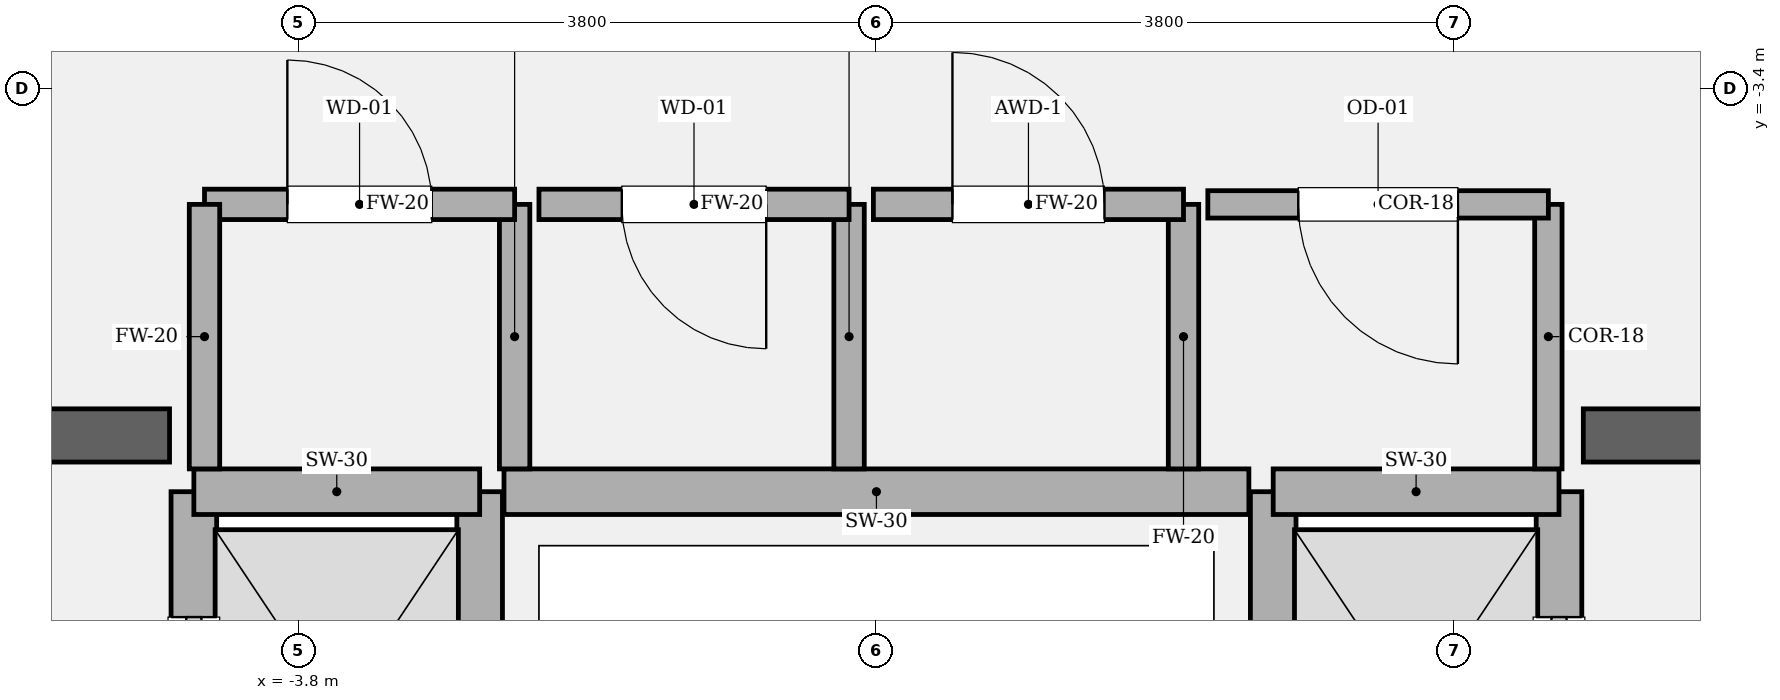
"""IFC4 building model, lengths in metres.
Left out: names, types, materials, properties, quantities, classifications, styles, units other than length and angle.
Written with IfcOpenShell. Run it as: python <this file> out.ifc"""

import sys

from ifc_helpers import new_model, si_unit, direction, frame, frame_2d, origin, place, context, subcontext, project, spatial, rectangle, extrude, element, fill, save


model = new_model("IFC4")
c1 = context("Model", 3, precision=1e-05, world=origin(), true_north=direction((0.0, 1.0)))
c2 = subcontext(c1, "Body", "Model", "MODEL_VIEW")
j1 = project(units=[si_unit("LENGTHUNIT", "METRE"), si_unit("PLANEANGLEUNIT", "RADIAN")], contexts=[c1])
p1 = place(None, origin())
s1 = spatial("IfcSite", under=j1, at=p1, CompositionType="ELEMENT")
p2 = place(p1, origin())
s2 = spatial("IfcBuilding", under=s1, at=p2, CompositionType="ELEMENT")
p3 = place(p2, frame((0.0, 0.0, 117.3)))
s3 = spatial("IfcBuildingStorey", under=s2, at=p3, CompositionType="ELEMENT", Elevation=117.3)
p4 = place(p3, frame((-9.825, -5.68, 0.0), z_axis=(0.0, 0.0, 1.0), x_axis=(1.0, 0.0, 0.0)))
e1 = element("IfcWall", 1, at=p4, inside=s3, PredefinedType="SOLIDWALL", context=c2, shape_type="SweptSolid", body=[
    extrude(rectangle(XDim=5.175, YDim=0.35, at=frame_2d((2.587, 0.0))), origin(), (0.0, 0.0, 1.0), 4.05),
])
p5 = place(p4, frame((1.285, 0.0, 0.0)))
e2 = element("IfcOpeningElement", 2, at=p5, cuts=e1, PredefinedType="OPENING", context=c2, shape_type="SweptSolid", body=[
    extrude(rectangle(XDim=1.18, YDim=2.2, at=frame_2d((0.59, 1.1))), frame((0.0, 0.185, 0.0), z_axis=(0.0, -1.0, 0.0), x_axis=(1.0, 0.0, 0.0)), (0.0, 0.0, 1.0), 0.37),
])
p6 = place(p3, frame((4.65, -5.68, 0.0), z_axis=(0.0, 0.0, 1.0), x_axis=(1.0, 0.0, 0.0)))
e3 = element("IfcWall", 3, at=p6, inside=s3, PredefinedType="SOLIDWALL", context=c2, shape_type="SweptSolid", body=[
    extrude(rectangle(XDim=5.175, YDim=0.35, at=frame_2d((2.587, 0.0))), origin(), (0.0, 0.0, 1.0), 4.05),
])
p7 = place(p6, frame((2.71, 0.0, 0.0)))
e4 = element("IfcOpeningElement", 4, at=p7, cuts=e3, PredefinedType="OPENING", context=c2, shape_type="SweptSolid", body=[
    extrude(rectangle(XDim=1.18, YDim=2.2, at=frame_2d((0.59, 1.1))), frame((0.0, 0.185, 0.0), z_axis=(0.0, -1.0, 0.0), x_axis=(1.0, 0.0, 0.0)), (0.0, 0.0, 1.0), 0.37),
])
p8 = place(p3, frame((-4.49, -8.82, 0.0), z_axis=(0.0, 0.0, 1.0), x_axis=(0.0, 1.0, 0.0)))
e5 = element("IfcWall", 5, at=p8, inside=s3, PredefinedType="SOLIDWALL", context=c2, shape_type="SweptSolid", body=[
    extrude(rectangle(XDim=2.77, YDim=0.3, at=frame_2d((1.385, 0.0))), origin(), (0.0, 0.0, 1.0), 3.81),
])
p9 = place(p8, frame((0.825, 0.0, 0.0)))
e6 = element("IfcOpeningElement", 6, at=p9, cuts=e5, PredefinedType="OPENING", context=c2, shape_type="SweptSolid", body=[
    extrude(rectangle(XDim=1.12, YDim=2.25, at=frame_2d((0.56, 1.125))), frame((0.0, 0.16, 0.0), z_axis=(0.0, -1.0, 0.0), x_axis=(1.0, 0.0, 0.0)), (0.0, 0.0, 1.0), 0.32),
])
p10 = place(p3, frame((-2.61, -8.82, 0.0), z_axis=(0.0, 0.0, 1.0), x_axis=(0.0, 1.0, 0.0)))
e7 = element("IfcWall", 7, at=p10, inside=s3, PredefinedType="SOLIDWALL", context=c2, shape_type="SweptSolid", body=[
    extrude(rectangle(XDim=2.77, YDim=0.3, at=frame_2d((1.385, 0.0))), origin(), (0.0, 0.0, 1.0), 3.81),
])
p11 = place(p3, frame((-4.49, -6.05, 0.0), z_axis=(0.0, 0.0, 1.0), x_axis=(1.0, 0.0, 0.0)))
e8 = element("IfcWall", 8, at=p11, inside=s3, PredefinedType="SOLIDWALL", context=c2, shape_type="SweptSolid", body=[
    extrude(rectangle(XDim=1.88, YDim=0.3, at=frame_2d((0.94, 0.0))), origin(), (0.0, 0.0, 1.0), 3.81),
])
p12 = place(p3, frame((4.49, -8.82, 0.0), z_axis=(0.0, 0.0, 1.0), x_axis=(0.0, 1.0, 0.0)))
e9 = element("IfcWall", 9, at=p12, inside=s3, PredefinedType="SOLIDWALL", context=c2, shape_type="SweptSolid", body=[
    extrude(rectangle(XDim=2.77, YDim=0.3, at=frame_2d((1.385, 0.0))), origin(), (0.0, 0.0, 1.0), 3.81),
])
p13 = place(p12, frame((0.825, 0.0, 0.0)))
e10 = element("IfcOpeningElement", 10, at=p13, cuts=e9, PredefinedType="OPENING", context=c2, shape_type="SweptSolid", body=[
    extrude(rectangle(XDim=1.12, YDim=2.25, at=frame_2d((0.56, 1.125))), frame((0.0, 0.16, 0.0), z_axis=(0.0, -1.0, 0.0), x_axis=(1.0, 0.0, 0.0)), (0.0, 0.0, 1.0), 0.32),
])
p14 = place(p3, frame((2.61, -8.82, 0.0), z_axis=(0.0, 0.0, 1.0), x_axis=(0.0, 1.0, 0.0)))
e11 = element("IfcWall", 11, at=p14, inside=s3, PredefinedType="SOLIDWALL", context=c2, shape_type="SweptSolid", body=[
    extrude(rectangle(XDim=2.77, YDim=0.3, at=frame_2d((1.385, 0.0))), origin(), (0.0, 0.0, 1.0), 3.81),
])
p15 = place(p3, frame((2.61, -6.05, 0.0), z_axis=(0.0, 0.0, 1.0), x_axis=(1.0, 0.0, 0.0)))
e12 = element("IfcWall", 12, at=p15, inside=s3, PredefinedType="SOLIDWALL", context=c2, shape_type="SweptSolid", body=[
    extrude(rectangle(XDim=1.88, YDim=0.3, at=frame_2d((0.94, 0.0))), origin(), (0.0, 0.0, 1.0), 3.81),
])
p16 = place(p3, frame((-2.45, -6.05, 0.0), z_axis=(0.0, 0.0, 1.0), x_axis=(1.0, 0.0, 0.0)))
e13 = element("IfcWall", 13, at=p16, inside=s3, PredefinedType="SOLIDWALL", context=c2, shape_type="SweptSolid", body=[
    extrude(rectangle(XDim=4.9, YDim=0.3, at=frame_2d((2.45, 0.0))), origin(), (0.0, 0.0, 1.0), 3.81),
])
p17 = place(p3, frame((-2.38, -5.9, 0.0), z_axis=(0.0, 0.0, 1.0), x_axis=(0.0, 1.0, 0.0)))
e14 = element("IfcWall", 14, at=p17, inside=s3, PredefinedType="SOLIDWALL", context=c2, shape_type="SweptSolid", body=[
    extrude(rectangle(XDim=1.74, YDim=0.2, at=frame_2d((0.87, 0.0))), origin(), (0.0, 0.0, 1.0), 3.81),
])
p18 = place(p3, frame((-2.38, -4.16, 0.0), z_axis=(0.0, 0.0, 1.0), x_axis=(-1.0, 0.0, 0.0)))
e15 = element("IfcWall", 15, at=p18, inside=s3, PredefinedType="SOLIDWALL", context=c2, shape_type="SweptSolid", body=[
    extrude(rectangle(XDim=2.04, YDim=0.2, at=frame_2d((1.02, 0.0))), origin(), (0.0, 0.0, 1.0), 3.81),
])
p19 = place(p18, frame((0.545, 0.0, 0.0)))
e16 = element("IfcOpeningElement", 16, at=p19, cuts=e15, PredefinedType="OPENING", context=c2, shape_type="SweptSolid", body=[
    extrude(rectangle(XDim=0.95, YDim=2.15, at=frame_2d((0.475, 1.075))), frame((0.0, 0.11, 0.0), z_axis=(0.0, -1.0, 0.0), x_axis=(1.0, 0.0, 0.0)), (0.0, 0.0, 1.0), 0.22),
])
for number, where, z_axis, x_axis in (
    (17, (-4.42, -4.16, 0.0), (0.0, 0.0, 1.0), (0.0, -1.0, 0.0)),
    (18, (-0.18, -5.9, 0.0), (0.0, 0.0, 1.0), (0.0, 1.0, 0.0)),
):
    element("IfcWall", number, at=place(p3, frame(where, z_axis=z_axis, x_axis=x_axis)), inside=s3, PredefinedType="SOLIDWALL", context=c2, shape_type="SweptSolid", body=[
        extrude(rectangle(XDim=1.74, YDim=0.2, at=frame_2d((0.87, 0.0))), origin(), (0.0, 0.0, 1.0), 3.81),
    ])
p20 = place(p3, frame((-0.18, -4.16, 0.0), z_axis=(0.0, 0.0, 1.0), x_axis=(-1.0, 0.0, 0.0)))
e19 = element("IfcWall", 19, at=p20, inside=s3, PredefinedType="SOLIDWALL", context=c2, shape_type="SweptSolid", body=[
    extrude(rectangle(XDim=2.04, YDim=0.2, at=frame_2d((1.02, 0.0))), origin(), (0.0, 0.0, 1.0), 3.81),
])
p21 = place(p20, frame((0.545, 0.0, 0.0)))
e20 = element("IfcOpeningElement", 20, at=p21, cuts=e19, PredefinedType="OPENING", context=c2, shape_type="SweptSolid", body=[
    extrude(rectangle(XDim=0.95, YDim=2.15, at=frame_2d((0.475, 1.075))), frame((0.0, 0.11, 0.0), z_axis=(0.0, -1.0, 0.0), x_axis=(1.0, 0.0, 0.0)), (0.0, 0.0, 1.0), 0.22),
])
p22 = place(p3, frame((2.02, -5.9, 0.0), z_axis=(0.0, 0.0, 1.0), x_axis=(0.0, 1.0, 0.0)))
e21 = element("IfcWall", 21, at=p22, inside=s3, PredefinedType="SOLIDWALL", context=c2, shape_type="SweptSolid", body=[
    extrude(rectangle(XDim=1.74, YDim=0.2, at=frame_2d((0.87, 0.0))), origin(), (0.0, 0.0, 1.0), 3.81),
])
p23 = place(p3, frame((2.02, -4.16, 0.0), z_axis=(0.0, 0.0, 1.0), x_axis=(-1.0, 0.0, 0.0)))
e22 = element("IfcWall", 22, at=p23, inside=s3, PredefinedType="SOLIDWALL", context=c2, shape_type="SweptSolid", body=[
    extrude(rectangle(XDim=2.04, YDim=0.2, at=frame_2d((1.02, 0.0))), origin(), (0.0, 0.0, 1.0), 3.81),
])
p24 = place(p23, frame((0.52, 0.0, 0.0)))
e23 = element("IfcOpeningElement", 23, at=p24, cuts=e22, PredefinedType="OPENING", context=c2, shape_type="SweptSolid", body=[
    extrude(rectangle(XDim=1.0, YDim=2.15, at=frame_2d((0.5, 1.075))), frame((0.0, 0.11, 0.0), z_axis=(0.0, -1.0, 0.0), x_axis=(1.0, 0.0, 0.0)), (0.0, 0.0, 1.0), 0.22),
])
p25 = place(p3, frame((4.42, -5.9, 0.0), z_axis=(0.0, 0.0, 1.0), x_axis=(0.0, 1.0, 0.0)))
e24 = element("IfcWall", 24, at=p25, inside=s3, PredefinedType="PARTITIONING", context=c2, shape_type="SweptSolid", body=[
    extrude(rectangle(XDim=1.74, YDim=0.18, at=frame_2d((0.87, 0.0))), origin(), (0.0, 0.0, 1.0), 3.81),
])
p26 = place(p3, frame((4.42, -4.16, 0.0), z_axis=(0.0, 0.0, 1.0), x_axis=(-1.0, 0.0, 0.0)))
e25 = element("IfcWall", 25, at=p26, inside=s3, PredefinedType="PARTITIONING", context=c2, shape_type="SweptSolid", body=[
    extrude(rectangle(XDim=2.24, YDim=0.18, at=frame_2d((1.12, 0.0))), origin(), (0.0, 0.0, 1.0), 3.81),
])
p27 = place(p26, frame((0.595, 0.0, 0.0)))
e26 = element("IfcOpeningElement", 26, at=p27, cuts=e25, PredefinedType="OPENING", context=c2, shape_type="SweptSolid", body=[
    extrude(rectangle(XDim=1.05, YDim=2.2, at=frame_2d((0.525, 1.1))), frame((0.0, 0.1, 0.0), z_axis=(0.0, -1.0, 0.0), x_axis=(1.0, 0.0, 0.0)), (0.0, 0.0, 1.0), 0.2),
])
p28 = place(p9, origin())
e27 = element("IfcDoor", 27, at=p28, inside=s3, OperationType="SLIDING_TO_LEFT", PredefinedType="DOOR", context=c2, shape_type="SweptSolid", body=[
    extrude(rectangle(XDim=1.12, YDim=2.25, at=frame_2d((0.56, 1.125))), frame((0.0, 0.025, 0.0), z_axis=(0.0, -1.0, 0.0), x_axis=(1.0, 0.0, 0.0)), (0.0, 0.0, 1.0), 0.05),
])
fill(e6, e27)
p29 = place(p13, origin())
e28 = element("IfcDoor", 28, at=p29, inside=s3, OperationType="SLIDING_TO_RIGHT", PredefinedType="DOOR", context=c2, shape_type="SweptSolid", body=[
    extrude(rectangle(XDim=1.12, YDim=2.25, at=frame_2d((0.56, 1.125))), frame((0.0, 0.025, 0.0), z_axis=(0.0, -1.0, 0.0), x_axis=(1.0, 0.0, 0.0)), (0.0, 0.0, 1.0), 0.05),
])
fill(e10, e28)
p30 = place(p19, origin())
e29 = element("IfcDoor", 29, at=p30, inside=s3, OperationType="SINGLE_SWING_RIGHT", PredefinedType="DOOR", context=c2, shape_type="SweptSolid", body=[
    extrude(rectangle(XDim=0.95, YDim=2.15, at=frame_2d((0.475, 1.075))), frame((0.0, 0.025, 0.0), z_axis=(0.0, -1.0, 0.0), x_axis=(1.0, 0.0, 0.0)), (0.0, 0.0, 1.0), 0.05),
])
fill(e16, e29)
p31 = place(p21, origin())
e30 = element("IfcDoor", 30, at=p31, inside=s3, OperationType="SINGLE_SWING_LEFT", PredefinedType="DOOR", context=c2, shape_type="SweptSolid", body=[
    extrude(rectangle(XDim=0.95, YDim=2.15, at=frame_2d((0.475, 1.075))), frame((0.0, 0.025, 0.0), z_axis=(0.0, -1.0, 0.0), x_axis=(1.0, 0.0, 0.0)), (0.0, 0.0, 1.0), 0.05),
])
fill(e20, e30)
p32 = place(p24, origin())
e31 = element("IfcDoor", 31, at=p32, inside=s3, OperationType="SINGLE_SWING_RIGHT", PredefinedType="DOOR", context=c2, shape_type="SweptSolid", body=[
    extrude(rectangle(XDim=1.0, YDim=2.15, at=frame_2d((0.5, 1.075))), frame((0.0, 0.025, 0.0), z_axis=(0.0, -1.0, 0.0), x_axis=(1.0, 0.0, 0.0)), (0.0, 0.0, 1.0), 0.05),
])
fill(e23, e31)
p33 = place(p27, origin())
e32 = element("IfcDoor", 32, at=p33, inside=s3, OperationType="SINGLE_SWING_LEFT", PredefinedType="DOOR", context=c2, shape_type="SweptSolid", body=[
    extrude(rectangle(XDim=1.05, YDim=2.2, at=frame_2d((0.525, 1.1))), frame((0.0, 0.025, 0.0), z_axis=(0.0, -1.0, 0.0), x_axis=(1.0, 0.0, 0.0)), (0.0, 0.0, 1.0), 0.05),
])
fill(e26, e32)
save(model, sys.argv[1])
